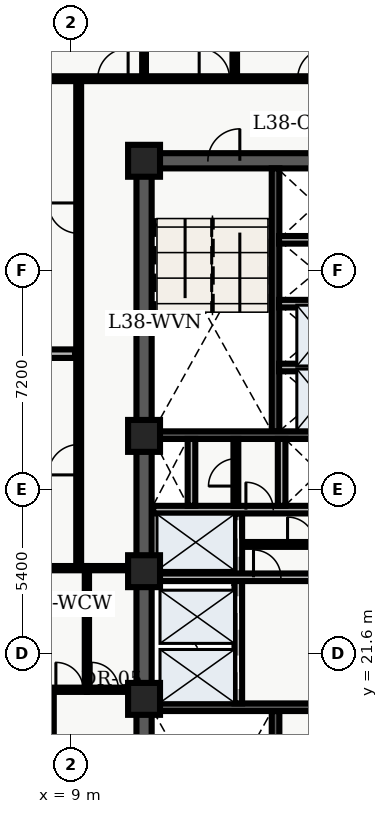
"""IFC4 building model, lengths in metres.
Left out: names, types, materials, properties, quantities, classifications, styles, units other than length and angle.
Written with IfcOpenShell. Run it as: python <this file> out.ifc"""

import sys

from ifc_helpers import new_model, entity, si_unit, converted_unit, direction, frame, origin_with_axes, origin_2d_with_axis, place, context, subcontext, project, spatial, polyline, rectangle, outline, extrude, element, fill, save


model = new_model("IFC4")
c1 = context("Model", 3, precision=1e-05, world=origin_with_axes(), true_north=direction((0.0, 1.0)))
c2 = subcontext(c1, "Body", "Model", "MODEL_VIEW")
j1 = project(units=[si_unit("LENGTHUNIT", "METRE"), converted_unit("PLANEANGLEUNIT", "DEGREE", entity("IfcPlaneAngleMeasure", 0.017), si_unit("PLANEANGLEUNIT", "RADIAN"), dimensions=[0, 0, 0, 0, 0, 0, 0])], contexts=[c1])
p1 = place(None, origin_with_axes())
s1 = spatial("IfcSite", under=j1, at=p1, CompositionType="ELEMENT")
p2 = place(p1, origin_with_axes())
s2 = spatial("IfcBuilding", under=s1, at=p2, CompositionType="ELEMENT")
p3 = place(p2, frame((0.0, 0.0, 156.3), z_axis=(0.0, 0.0, 1.0), x_axis=(1.0, 0.0, 0.0)))
s3 = spatial("IfcBuildingStorey", under=s2, at=p3, CompositionType="ELEMENT", Elevation=156.3)
p4 = place(p3, frame((11.4, 10.8, 0.0), z_axis=(0.0, 0.0, 1.0), x_axis=(0.0, 1.0, 0.0)))
e1 = element("IfcWall", 1, at=p4, inside=s3, PredefinedType="SHEAR", context=c2, shape_type="SweptSolid", body=[
    extrude(outline(polyline([(0.0, -0.25), (27.0, -0.25), (27.0, 0.25), (0.0, 0.25), (0.0, -0.25)])), origin_with_axes(), (0.0, 0.0, 1.0), 3.66),
])
p5 = place(p3, frame((11.4, 37.8, 0.0), z_axis=(0.0, 0.0, 1.0), x_axis=(1.0, 0.0, 0.0)))
e2 = element("IfcWall", 2, at=p5, inside=s3, PredefinedType="SHEAR", context=c2, shape_type="SweptSolid", body=[
    extrude(outline(polyline([(0.0, -0.25), (7.2, -0.25), (7.2, 0.25), (0.0, 0.25), (0.0, -0.25)])), origin_with_axes(), (0.0, 0.0, 1.0), 3.66),
])
p6 = place(p5, frame((2.625, 0.0, 0.0), z_axis=(0.0, 0.0, 1.0), x_axis=(1.0, 0.0, 0.0)))
e3 = element("IfcOpeningElement", 3, at=p6, cuts=e2, PredefinedType="OPENING", context=c2, shape_type="SweptSolid", body=[
    extrude(rectangle(XDim=1.05, YDim=0.52, at=origin_2d_with_axis()), origin_with_axes(), (0.0, 0.0, 1.0), 2.15),
])
p7 = place(p3, frame((15.725, 11.05, 0.0), z_axis=(0.0, 0.0, 1.0), x_axis=(0.0, 1.0, 0.0)))
e4 = element("IfcWall", 4, at=p7, inside=s3, PredefinedType="SHEAR", context=c2, shape_type="SweptSolid", body=[
    extrude(outline(polyline([(0.0, -0.125), (8.65, -0.125), (8.65, 0.125), (0.0, 0.125), (0.0, -0.125)])), origin_with_axes(), (0.0, 0.0, 1.0), 3.66),
])
p8 = place(p3, frame((11.65, 19.825, 0.0), z_axis=(0.0, 0.0, 1.0), x_axis=(1.0, 0.0, 0.0)))
e5 = element("IfcWall", 5, at=p8, inside=s3, PredefinedType="SHEAR", context=c2, shape_type="SweptSolid", body=[
    extrude(outline(polyline([(0.0, -0.125), (6.7, -0.125), (6.7, 0.125), (0.0, 0.125), (0.0, -0.125)])), origin_with_axes(), (0.0, 0.0, 1.0), 3.66),
])
p9 = place(p3, frame((15.725, 28.9, 0.0), z_axis=(0.0, 0.0, 1.0), x_axis=(0.0, 1.0, 0.0)))
e6 = element("IfcWall", 6, at=p9, inside=s3, PredefinedType="SHEAR", context=c2, shape_type="SweptSolid", body=[
    extrude(outline(polyline([(0.0, -0.125), (8.65, -0.125), (8.65, 0.125), (0.0, 0.125), (0.0, -0.125)])), origin_with_axes(), (0.0, 0.0, 1.0), 3.66),
])
p10 = place(p3, frame((11.65, 28.775, 0.0), z_axis=(0.0, 0.0, 1.0), x_axis=(1.0, 0.0, 0.0)))
e7 = element("IfcWall", 7, at=p10, inside=s3, PredefinedType="SHEAR", context=c2, shape_type="SweptSolid", body=[
    extrude(outline(polyline([(0.0, -0.125), (6.7, -0.125), (6.7, 0.125), (0.0, 0.125), (0.0, -0.125)])), origin_with_axes(), (0.0, 0.0, 1.0), 3.66),
])
p11 = place(p3, frame((14.5, 19.95, 0.0), z_axis=(0.0, 0.0, 1.0), x_axis=(0.0, 1.0, 0.0)))
e8 = element("IfcWall", 8, at=p11, inside=s3, PredefinedType="SOLIDWALL", context=c2, shape_type="SweptSolid", body=[
    extrude(outline(polyline([(0.0, -0.125), (6.25, -0.125), (6.25, 0.125), (0.0, 0.125), (0.0, -0.125)])), origin_with_axes(), (0.0, 0.0, 1.0), 2.7),
])
p12 = place(p11, frame((1.025, 0.0, 0.0), z_axis=(0.0, 0.0, 1.0), x_axis=(1.0, 0.0, 0.0)))
e9 = element("IfcOpeningElement", 9, at=p12, cuts=e8, PredefinedType="OPENING", context=c2, shape_type="SweptSolid", body=[
    extrude(rectangle(XDim=1.1, YDim=0.27, at=origin_2d_with_axis()), origin_with_axes(), (0.0, 0.0, 1.0), 2.15),
])
p13 = place(p11, frame((2.975, 0.0, 0.0), z_axis=(0.0, 0.0, 1.0), x_axis=(1.0, 0.0, 0.0)))
e10 = element("IfcOpeningElement", 10, at=p13, cuts=e8, PredefinedType="OPENING", context=c2, shape_type="SweptSolid", body=[
    extrude(rectangle(XDim=1.1, YDim=0.27, at=origin_2d_with_axis()), origin_with_axes(), (0.0, 0.0, 1.0), 2.15),
])
p14 = place(p11, frame((5.425, 0.0, 0.0), z_axis=(0.0, 0.0, 1.0), x_axis=(1.0, 0.0, 0.0)))
e11 = element("IfcOpeningElement", 11, at=p14, cuts=e8, PredefinedType="OPENING", context=c2, shape_type="SweptSolid", body=[
    extrude(rectangle(XDim=1.2, YDim=0.27, at=origin_2d_with_axis()), origin_with_axes(), (0.0, 0.0, 1.0), 2.15),
])
p15 = place(p3, frame((11.7, 24.1, 0.0), z_axis=(0.0, 0.0, 1.0), x_axis=(1.0, 0.0, 0.0)))
e12 = element("IfcWall", 12, at=p15, inside=s3, PredefinedType="SOLIDWALL", context=c2, shape_type="SweptSolid", body=[
    extrude(outline(polyline([(0.0, -0.125), (6.6, -0.125), (6.6, 0.125), (0.0, 0.125), (0.0, -0.125)])), origin_with_axes(), (0.0, 0.0, 1.0), 2.7),
])
p16 = place(p15, frame((3.75, 0.0, 0.0), z_axis=(0.0, 0.0, 1.0), x_axis=(1.0, 0.0, 0.0)))
e13 = element("IfcOpeningElement", 13, at=p16, cuts=e12, PredefinedType="OPENING", context=c2, shape_type="SweptSolid", body=[
    extrude(rectangle(XDim=0.9, YDim=0.27, at=origin_2d_with_axis()), origin_with_axes(), (0.0, 0.0, 1.0), 2.15),
])
p17 = place(p3, frame((11.7, 26.325, 0.0), z_axis=(0.0, 0.0, 1.0), x_axis=(1.0, 0.0, 0.0)))
e14 = element("IfcWall", 14, at=p17, inside=s3, PredefinedType="SOLIDWALL", context=c2, shape_type="SweptSolid", body=[
    extrude(outline(polyline([(0.0, -0.125), (6.6, -0.125), (6.6, 0.125), (0.0, 0.125), (0.0, -0.125)])), origin_with_axes(), (0.0, 0.0, 1.0), 2.7),
])
p18 = place(p17, frame((3.5, 0.0, 0.0), z_axis=(0.0, 0.0, 1.0), x_axis=(1.0, 0.0, 0.0)))
e15 = element("IfcOpeningElement", 15, at=p18, cuts=e14, PredefinedType="OPENING", context=c2, shape_type="SweptSolid", body=[
    extrude(rectangle(XDim=0.9, YDim=0.27, at=origin_2d_with_axis()), origin_with_axes(), (0.0, 0.0, 1.0), 2.15),
])
for number, where, z_axis, x_axis in (
    (16, (12.96, 26.45, 0.0), (0.0, 0.0, 1.0), (0.0, 1.0, 0.0)),
    (17, (15.925, 26.45, 0.0), (0.0, 0.0, 1.0), (0.0, 1.0, 0.0)),
):
    element("IfcWall", number, at=place(p3, frame(where, z_axis=z_axis, x_axis=x_axis)), inside=s3, PredefinedType="SOLIDWALL", context=c2, shape_type="SweptSolid", body=[
        extrude(outline(polyline([(0.0, -0.125), (2.2, -0.125), (2.2, 0.125), (0.0, 0.125), (0.0, -0.125)])), origin_with_axes(), (0.0, 0.0, 1.0), 2.7),
    ])
for number, where, z_axis, x_axis in (
    (18, (11.4, 20.1, 0.0), (0.0, 0.0, 1.0), (1.0, 0.0, 0.0)),
    (19, (11.4, 24.3, 0.0), (0.0, 0.0, 1.0), (1.0, 0.0, 0.0)),
    (20, (11.4, 28.75, 0.0), (0.0, 0.0, 1.0), (1.0, 0.0, 0.0)),
    (21, (11.4, 37.8, 0.0), (0.0, 0.0, 1.0), (1.0, 0.0, 0.0)),
):
    element("IfcColumn", number, at=place(p3, frame(where, z_axis=z_axis, x_axis=x_axis)), inside=s3, PredefinedType="COLUMN", context=c2, shape_type="SweptSolid", body=[
        extrude(rectangle(XDim=1.05, YDim=1.05, at=origin_2d_with_axis()), origin_with_axes(), (0.0, 0.0, 1.0), 3.9),
    ])
p19 = place(p3, frame((14.62, 25.18, 0.0), z_axis=(0.0, 0.0, 1.0), x_axis=(1.0, 0.0, 0.0)))
e22 = element("IfcWall", 22, at=p19, inside=s3, PredefinedType="PARTITIONING", context=c2, shape_type="SweptSolid", body=[
    extrude(outline(polyline([(0.0, -0.08), (3.68, -0.08), (3.68, 0.08), (0.0, 0.08), (0.0, -0.08)])), origin_with_axes(), (0.0, 0.0, 1.0), 2.7),
])
p20 = place(p19, frame((1.95, 0.0, 0.0), z_axis=(0.0, 0.0, 1.0), x_axis=(1.0, 0.0, 0.0)))
e23 = element("IfcOpeningElement", 23, at=p20, cuts=e22, PredefinedType="OPENING", context=c2, shape_type="SweptSolid", body=[
    extrude(rectangle(XDim=0.9, YDim=0.18, at=origin_2d_with_axis()), origin_with_axes(), (0.0, 0.0, 1.0), 2.15),
])
p21 = place(p3, frame((14.42, 26.45, 0.0), z_axis=(0.0, 0.0, 1.0), x_axis=(0.0, 1.0, 0.0)))
e24 = element("IfcWall", 24, at=p21, inside=s3, PredefinedType="PARTITIONING", context=c2, shape_type="SweptSolid", body=[
    extrude(outline(polyline([(0.0, -0.08), (2.2, -0.08), (2.2, 0.08), (0.0, 0.08), (0.0, -0.08)])), origin_with_axes(), (0.0, 0.0, 1.0), 2.7),
])
p22 = place(p21, frame((1.1, 0.0, 0.0), z_axis=(0.0, 0.0, 1.0), x_axis=(1.0, 0.0, 0.0)))
e25 = element("IfcOpeningElement", 25, at=p22, cuts=e24, PredefinedType="OPENING", context=c2, shape_type="SweptSolid", body=[
    extrude(rectangle(XDim=0.9, YDim=0.18, at=origin_2d_with_axis()), origin_with_axes(), (0.0, 0.0, 1.0), 2.15),
])
for number, where, z_axis, x_axis in (
    (26, (15.84, 31.0, 0.0), (0.0, 0.0, 1.0), (1.0, 0.0, 0.0)),
    (27, (15.84, 33.1, 0.0), (0.0, 0.0, 1.0), (1.0, 0.0, 0.0)),
    (28, (15.84, 35.2, 0.0), (0.0, 0.0, 1.0), (1.0, 0.0, 0.0)),
):
    element("IfcWall", number, at=place(p3, frame(where, z_axis=z_axis, x_axis=x_axis)), inside=s3, PredefinedType="SOLIDWALL", context=c2, shape_type="SweptSolid", body=[
        extrude(outline(polyline([(0.0, -0.125), (2.46, -0.125), (2.46, 0.125), (0.0, 0.125), (0.0, -0.125)])), origin_with_axes(), (0.0, 0.0, 1.0), 2.7),
    ])
p23 = place(p3, frame((9.52, 20.4, 0.0), z_axis=(0.0, 0.0, 1.0), x_axis=(0.0, 1.0, 0.0)))
e29 = element("IfcWall", 29, at=p23, inside=s3, PredefinedType="PARTITIONING", context=c2, shape_type="SweptSolid", body=[
    extrude(outline(polyline([(0.0, -0.07), (4.0, -0.07), (4.0, 0.07), (0.0, 0.07), (0.0, -0.07)])), origin_with_axes(), (0.0, 0.0, 1.0), 2.7),
])
p24 = place(p3, frame((9.52, 20.4, 0.0), z_axis=(0.0, 0.0, 1.0), x_axis=(1.0, 0.0, 0.0)))
e30 = element("IfcWall", 30, at=p24, inside=s3, PredefinedType="PARTITIONING", context=c2, shape_type="SweptSolid", body=[
    extrude(outline(polyline([(0.0, -0.07), (1.58, -0.07), (1.58, 0.07), (0.0, 0.07), (0.0, -0.07)])), origin_with_axes(), (0.0, 0.0, 1.0), 2.7),
])
p25 = place(p24, frame((0.59, 0.0, 0.0), z_axis=(0.0, 0.0, 1.0), x_axis=(1.0, 0.0, 0.0)))
e31 = element("IfcOpeningElement", 31, at=p25, cuts=e30, PredefinedType="OPENING", context=c2, shape_type="SweptSolid", body=[
    extrude(rectangle(XDim=0.9, YDim=0.16, at=origin_2d_with_axis()), origin_with_axes(), (0.0, 0.0, 1.0), 2.15),
])
p26 = place(p3, frame((9.52, 24.4, 0.0), z_axis=(0.0, 0.0, 1.0), x_axis=(1.0, 0.0, 0.0)))
e32 = element("IfcWall", 32, at=p26, inside=s3, PredefinedType="PARTITIONING", context=c2, shape_type="SweptSolid", body=[
    extrude(outline(polyline([(0.0, -0.07), (1.58, -0.07), (1.58, 0.07), (0.0, 0.07), (0.0, -0.07)])), origin_with_axes(), (0.0, 0.0, 1.0), 2.7),
])
p27 = place(p3, frame((2.6, 40.5, 0.0), z_axis=(0.0, 0.0, 1.0), x_axis=(1.0, 0.0, 0.0)))
e33 = element("IfcWall", 33, at=p27, inside=s3, PredefinedType="PARTITIONING", context=c2, shape_type="SweptSolid", body=[
    extrude(outline(polyline([(0.0, -0.08), (20.117, -0.08), (20.117, 0.08), (0.0, 0.08), (0.0, -0.08)])), origin_with_axes(), (0.0, 0.0, 1.0), 2.7),
])
p28 = place(p27, frame((1.72, 0.0, 0.0), z_axis=(0.0, 0.0, 1.0), x_axis=(1.0, 0.0, 0.0)))
e34 = element("IfcOpeningElement", 34, at=p28, cuts=e33, PredefinedType="OPENING", context=c2, shape_type="SweptSolid", body=[
    extrude(rectangle(XDim=1.0, YDim=0.18, at=origin_2d_with_axis()), origin_with_axes(), (0.0, 0.0, 1.0), 2.15),
])
p29 = place(p27, frame((7.776, 0.0, 0.0), z_axis=(0.0, 0.0, 1.0), x_axis=(1.0, 0.0, 0.0)))
e35 = element("IfcOpeningElement", 35, at=p29, cuts=e33, PredefinedType="OPENING", context=c2, shape_type="SweptSolid", body=[
    extrude(rectangle(XDim=1.0, YDim=0.18, at=origin_2d_with_axis()), origin_with_axes(), (0.0, 0.0, 1.0), 2.15),
])
p30 = place(p27, frame((11.113, 0.0, 0.0), z_axis=(0.0, 0.0, 1.0), x_axis=(1.0, 0.0, 0.0)))
e36 = element("IfcOpeningElement", 36, at=p30, cuts=e33, PredefinedType="OPENING", context=c2, shape_type="SweptSolid", body=[
    extrude(rectangle(XDim=1.0, YDim=0.18, at=origin_2d_with_axis()), origin_with_axes(), (0.0, 0.0, 1.0), 2.15),
])
p31 = place(p27, frame((14.352, 0.0, 0.0), z_axis=(0.0, 0.0, 1.0), x_axis=(1.0, 0.0, 0.0)))
e37 = element("IfcOpeningElement", 37, at=p31, cuts=e33, PredefinedType="OPENING", context=c2, shape_type="SweptSolid", body=[
    extrude(rectangle(XDim=1.0, YDim=0.18, at=origin_2d_with_axis()), origin_with_axes(), (0.0, 0.0, 1.0), 2.15),
])
p32 = place(p3, frame((8.35, 7.8, 0.0), z_axis=(0.0, 0.0, 1.0), x_axis=(0.0, 1.0, 0.0)))
e38 = element("IfcWall", 38, at=p32, inside=s3, PredefinedType="PARTITIONING", context=c2, shape_type="SweptSolid", body=[
    extrude(outline(polyline([(0.0, -0.08), (12.6, -0.08), (12.6, 0.08), (0.0, 0.08), (0.0, -0.08)])), origin_with_axes(), (0.0, 0.0, 1.0), 2.7),
])
p33 = place(p32, frame((2.893, 0.0, 0.0), z_axis=(0.0, 0.0, 1.0), x_axis=(1.0, 0.0, 0.0)))
e39 = element("IfcOpeningElement", 39, at=p33, cuts=e38, PredefinedType="OPENING", context=c2, shape_type="SweptSolid", body=[
    extrude(rectangle(XDim=1.0, YDim=0.18, at=origin_2d_with_axis()), origin_with_axes(), (0.0, 0.0, 1.0), 2.15),
])
p34 = place(p32, frame((9.088, 0.0, 0.0), z_axis=(0.0, 0.0, 1.0), x_axis=(1.0, 0.0, 0.0)))
e40 = element("IfcOpeningElement", 40, at=p34, cuts=e38, PredefinedType="OPENING", context=c2, shape_type="SweptSolid", body=[
    extrude(rectangle(XDim=1.0, YDim=0.18, at=origin_2d_with_axis()), origin_with_axes(), (0.0, 0.0, 1.0), 2.15),
])
p35 = place(p3, frame((9.25, 24.4, 0.0), z_axis=(0.0, 0.0, 1.0), x_axis=(0.0, 1.0, 0.0)))
e41 = element("IfcWall", 41, at=p35, inside=s3, PredefinedType="PARTITIONING", context=c2, shape_type="SweptSolid", body=[
    extrude(outline(polyline([(0.0, -0.08), (16.1, -0.08), (16.1, 0.08), (0.0, 0.08), (0.0, -0.08)])), origin_with_axes(), (0.0, 0.0, 1.0), 2.7),
])
p36 = place(p35, frame((3.567, 0.0, 0.0), z_axis=(0.0, 0.0, 1.0), x_axis=(1.0, 0.0, 0.0)))
e42 = element("IfcOpeningElement", 42, at=p36, cuts=e41, PredefinedType="OPENING", context=c2, shape_type="SweptSolid", body=[
    extrude(rectangle(XDim=1.0, YDim=0.18, at=origin_2d_with_axis()), origin_with_axes(), (0.0, 0.0, 1.0), 2.15),
])
p37 = place(p35, frame((11.512, 0.0, 0.0), z_axis=(0.0, 0.0, 1.0), x_axis=(1.0, 0.0, 0.0)))
e43 = element("IfcOpeningElement", 43, at=p37, cuts=e41, PredefinedType="OPENING", context=c2, shape_type="SweptSolid", body=[
    extrude(rectangle(XDim=1.0, YDim=0.18, at=origin_2d_with_axis()), origin_with_axes(), (0.0, 0.0, 1.0), 2.15),
])
p38 = place(p3, frame((0.335, 20.4, 0.0), z_axis=(0.0, 0.0, 1.0), x_axis=(1.0, 0.0, 0.0)))
e44 = element("IfcWall", 44, at=p38, inside=s3, PredefinedType="PARTITIONING", context=c2, shape_type="SweptSolid", body=[
    extrude(outline(polyline([(0.0, -0.07), (9.185, -0.07), (9.185, 0.07), (0.0, 0.07), (0.0, -0.07)])), origin_with_axes(), (0.0, 0.0, 1.0), 2.7),
])
p39 = place(p38, frame((8.615, 0.0, 0.0), z_axis=(0.0, 0.0, 1.0), x_axis=(1.0, 0.0, 0.0)))
e45 = element("IfcOpeningElement", 45, at=p39, cuts=e44, PredefinedType="OPENING", context=c2, shape_type="SweptSolid", body=[
    extrude(rectangle(XDim=0.9, YDim=0.16, at=origin_2d_with_axis()), origin_with_axes(), (0.0, 0.0, 1.0), 2.15),
])
p40 = place(p3, frame((0.335, 24.4, 0.0), z_axis=(0.0, 0.0, 1.0), x_axis=(1.0, 0.0, 0.0)))
e46 = element("IfcWall", 46, at=p40, inside=s3, PredefinedType="PARTITIONING", context=c2, shape_type="SweptSolid", body=[
    extrude(outline(polyline([(0.0, -0.07), (9.185, -0.07), (9.185, 0.07), (0.0, 0.07), (0.0, -0.07)])), origin_with_axes(), (0.0, 0.0, 1.0), 2.7),
])
p41 = place(p3, frame((0.335, 31.455, 0.0), z_axis=(0.0, 0.0, 1.0), x_axis=(1.0, 0.0, 0.0)))
e47 = element("IfcWall", 47, at=p41, inside=s3, PredefinedType="PARTITIONING", context=c2, shape_type="SweptSolid", body=[
    extrude(outline(polyline([(0.0, -0.14), (8.795, -0.14), (8.795, 0.14), (0.0, 0.14), (0.0, -0.14)])), origin_with_axes(), (0.0, 0.0, 1.0), 2.7),
])
p42 = place(p3, frame((11.4, 40.6, 0.0), z_axis=(0.0, 0.0, 1.0), x_axis=(0.0, 1.0, 0.0)))
e48 = element("IfcWall", 48, at=p42, inside=s3, PredefinedType="PARTITIONING", context=c2, shape_type="SweptSolid", body=[
    extrude(outline(polyline([(0.0, -0.062), (7.665, -0.062), (7.665, 0.062), (0.0, 0.062), (0.0, -0.062)])), origin_with_axes(), (0.0, 0.0, 1.0), 2.7),
])
p43 = place(p3, frame((14.383, 40.6, 0.0), z_axis=(0.0, 0.0, 1.0), x_axis=(0.0, 1.0, 0.0)))
e49 = element("IfcWall", 49, at=p43, inside=s3, PredefinedType="PARTITIONING", context=c2, shape_type="SweptSolid", body=[
    extrude(outline(polyline([(0.0, -0.075), (7.665, -0.075), (7.665, 0.075), (0.0, 0.075), (0.0, -0.075)])), origin_with_axes(), (0.0, 0.0, 1.0), 2.7),
])
p44 = place(p11, frame((1.025, 0.0, 0.0), z_axis=(0.0, 0.0, 1.0), x_axis=(1.0, 0.0, 0.0)))
e50 = element("IfcDoor", 50, at=p44, inside=s3, OperationType="SLIDING_TO_LEFT", PredefinedType="DOOR", context=c2, shape_type="SweptSolid", body=[
    extrude(rectangle(XDim=1.1, YDim=0.09, at=origin_2d_with_axis()), origin_with_axes(), (0.0, 0.0, 1.0), 2.15),
])
fill(e9, e50)
p45 = place(p11, frame((2.975, 0.0, 0.0), z_axis=(0.0, 0.0, 1.0), x_axis=(1.0, 0.0, 0.0)))
e51 = element("IfcDoor", 51, at=p45, inside=s3, OperationType="SLIDING_TO_RIGHT", PredefinedType="DOOR", context=c2, shape_type="SweptSolid", body=[
    extrude(rectangle(XDim=1.1, YDim=0.09, at=origin_2d_with_axis()), origin_with_axes(), (0.0, 0.0, 1.0), 2.15),
])
fill(e10, e51)
p46 = place(p11, frame((5.425, 0.0, 0.0), z_axis=(0.0, 0.0, 1.0), x_axis=(1.0, 0.0, 0.0)))
e52 = element("IfcDoor", 52, at=p46, inside=s3, OperationType="DOUBLE_DOOR_SLIDING", PredefinedType="DOOR", context=c2, shape_type="SweptSolid", body=[
    extrude(rectangle(XDim=1.2, YDim=0.09, at=origin_2d_with_axis()), origin_with_axes(), (0.0, 0.0, 1.0), 2.15),
])
fill(e11, e52)
p47 = place(p5, frame((2.625, 0.0, 0.0), z_axis=(0.0, 0.0, 1.0), x_axis=(1.0, 0.0, 0.0)))
e53 = element("IfcDoor", 53, at=p47, inside=s3, OperationType="SINGLE_SWING_RIGHT", PredefinedType="DOOR", context=c2, shape_type="SweptSolid", body=[
    extrude(rectangle(XDim=1.05, YDim=0.09, at=origin_2d_with_axis()), origin_with_axes(), (0.0, 0.0, 1.0), 2.15),
])
fill(e3, e53)
p48 = place(p17, frame((3.5, 0.0, 0.0), z_axis=(0.0, 0.0, 1.0), x_axis=(1.0, 0.0, 0.0)))
e54 = element("IfcDoor", 54, at=p48, inside=s3, OperationType="SINGLE_SWING_LEFT", PredefinedType="DOOR", context=c2, shape_type="SweptSolid", body=[
    extrude(rectangle(XDim=0.9, YDim=0.09, at=origin_2d_with_axis()), origin_with_axes(), (0.0, 0.0, 1.0), 2.15),
])
fill(e15, e54)
p49 = place(p21, frame((1.1, 0.0, 0.0), z_axis=(0.0, 0.0, 1.0), x_axis=(1.0, 0.0, 0.0)))
e55 = element("IfcDoor", 55, at=p49, inside=s3, OperationType="SINGLE_SWING_LEFT", PredefinedType="DOOR", context=c2, shape_type="SweptSolid", body=[
    extrude(rectangle(XDim=0.9, YDim=0.09, at=origin_2d_with_axis()), origin_with_axes(), (0.0, 0.0, 1.0), 2.15),
])
fill(e25, e55)
p50 = place(p15, frame((3.75, 0.0, 0.0), z_axis=(0.0, 0.0, 1.0), x_axis=(1.0, 0.0, 0.0)))
e56 = element("IfcDoor", 56, at=p50, inside=s3, OperationType="SINGLE_SWING_LEFT", PredefinedType="DOOR", context=c2, shape_type="SweptSolid", body=[
    extrude(rectangle(XDim=0.9, YDim=0.09, at=origin_2d_with_axis()), origin_with_axes(), (0.0, 0.0, 1.0), 2.15),
])
fill(e13, e56)
p51 = place(p19, frame((1.95, 0.0, 0.0), z_axis=(0.0, 0.0, 1.0), x_axis=(1.0, 0.0, 0.0)))
e57 = element("IfcDoor", 57, at=p51, inside=s3, OperationType="SINGLE_SWING_LEFT", PredefinedType="DOOR", context=c2, shape_type="SweptSolid", body=[
    extrude(rectangle(XDim=0.9, YDim=0.09, at=origin_2d_with_axis()), origin_with_axes(), (0.0, 0.0, 1.0), 2.15),
])
fill(e23, e57)
p52 = place(p24, frame((0.59, 0.0, 0.0), z_axis=(0.0, 0.0, 1.0), x_axis=(1.0, 0.0, 0.0)))
e58 = element("IfcDoor", 58, at=p52, inside=s3, OperationType="SINGLE_SWING_LEFT", PredefinedType="DOOR", context=c2, shape_type="SweptSolid", body=[
    extrude(rectangle(XDim=0.9, YDim=0.084, at=origin_2d_with_axis()), origin_with_axes(), (0.0, 0.0, 1.0), 2.15),
])
fill(e31, e58)
p53 = place(p38, frame((8.615, 0.0, 0.0), z_axis=(0.0, 0.0, 1.0), x_axis=(1.0, 0.0, 0.0)))
e59 = element("IfcDoor", 59, at=p53, inside=s3, OperationType="SINGLE_SWING_LEFT", PredefinedType="DOOR", context=c2, shape_type="SweptSolid", body=[
    extrude(rectangle(XDim=0.9, YDim=0.084, at=origin_2d_with_axis()), origin_with_axes(), (0.0, 0.0, 1.0), 2.15),
])
fill(e45, e59)
p54 = place(p35, frame((3.567, 0.0, 0.0), z_axis=(0.0, 0.0, 1.0), x_axis=(1.0, 0.0, 0.0)))
e60 = element("IfcDoor", 60, at=p54, inside=s3, OperationType="SINGLE_SWING_LEFT", PredefinedType="DOOR", context=c2, shape_type="SweptSolid", body=[
    extrude(rectangle(XDim=1.0, YDim=0.09, at=origin_2d_with_axis()), origin_with_axes(), (0.0, 0.0, 1.0), 2.15),
])
fill(e42, e60)
p55 = place(p35, frame((11.512, 0.0, 0.0), z_axis=(0.0, 0.0, 1.0), x_axis=(1.0, 0.0, 0.0)))
e61 = element("IfcDoor", 61, at=p55, inside=s3, OperationType="SINGLE_SWING_RIGHT", PredefinedType="DOOR", context=c2, shape_type="SweptSolid", body=[
    extrude(rectangle(XDim=1.0, YDim=0.09, at=origin_2d_with_axis()), origin_with_axes(), (0.0, 0.0, 1.0), 2.15),
])
fill(e43, e61)
p56 = place(p27, frame((7.776, 0.0, 0.0), z_axis=(0.0, 0.0, 1.0), x_axis=(1.0, 0.0, 0.0)))
e62 = element("IfcDoor", 62, at=p56, inside=s3, OperationType="SINGLE_SWING_RIGHT", PredefinedType="DOOR", context=c2, shape_type="SweptSolid", body=[
    extrude(rectangle(XDim=1.0, YDim=0.09, at=origin_2d_with_axis()), origin_with_axes(), (0.0, 0.0, 1.0), 2.15),
])
fill(e35, e62)
p57 = place(p27, frame((11.113, 0.0, 0.0), z_axis=(0.0, 0.0, 1.0), x_axis=(1.0, 0.0, 0.0)))
e63 = element("IfcDoor", 63, at=p57, inside=s3, OperationType="SINGLE_SWING_LEFT", PredefinedType="DOOR", context=c2, shape_type="SweptSolid", body=[
    extrude(rectangle(XDim=1.0, YDim=0.09, at=origin_2d_with_axis()), origin_with_axes(), (0.0, 0.0, 1.0), 2.15),
])
fill(e36, e63)
p58 = place(p27, frame((14.352, 0.0, 0.0), z_axis=(0.0, 0.0, 1.0), x_axis=(1.0, 0.0, 0.0)))
e64 = element("IfcDoor", 64, at=p58, inside=s3, OperationType="SINGLE_SWING_RIGHT", PredefinedType="DOOR", context=c2, shape_type="SweptSolid", body=[
    extrude(rectangle(XDim=1.0, YDim=0.09, at=origin_2d_with_axis()), origin_with_axes(), (0.0, 0.0, 1.0), 2.15),
])
fill(e37, e64)
save(model, sys.argv[1])
